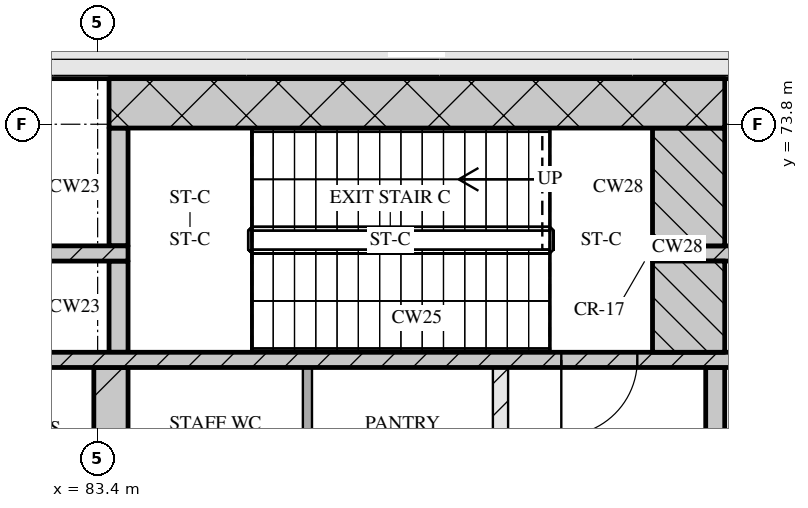
"""IFC4 building model, lengths in metres.
Left out: names, types, materials, properties, quantities, classifications, styles, units other than length and angle.
Written with IfcOpenShell. Run it as: python <this file> out.ifc"""

import sys

from ifc_helpers import new_model, si_unit, direction, frame, frame_2d, origin, place, context, subcontext, project, spatial, rectangle, extrude, element, fill, save


model = new_model("IFC4")
c1 = context("Model", 3, precision=1e-05, world=origin(), true_north=direction((0.0, 1.0)))
c2 = subcontext(c1, "Body", "Model", "MODEL_VIEW")
j1 = project(units=[si_unit("LENGTHUNIT", "METRE"), si_unit("PLANEANGLEUNIT", "RADIAN")], contexts=[c1])
p1 = place(None, origin())
s1 = spatial("IfcSite", under=j1, at=p1, CompositionType="ELEMENT")
p2 = place(p1, origin())
s2 = spatial("IfcBuilding", under=s1, at=p2, CompositionType="ELEMENT")
p3 = place(p2, frame((0.0, 0.0, 252.3)))
s3 = spatial("IfcBuildingStorey", under=s2, at=p3, CompositionType="ELEMENT", Elevation=252.3)
p4 = place(p3, frame((67.3, 74.65, 0.0), z_axis=(0.0, 0.0, 1.0), x_axis=(1.0, 0.0, 0.0)))
e1 = element("IfcWall", 1, at=p4, inside=s3, PredefinedType="SOLIDWALL", context=c2, shape_type="SweptSolid", body=[
    extrude(rectangle(XDim=40.6, YDim=0.5, at=frame_2d((20.3, 0.0))), origin(), (0.0, 0.0, 1.0), 10.97),
])
p5 = place(p3, frame((83.575, 68.0, 0.0), z_axis=(0.0, 0.0, 1.0), x_axis=(0.0, 1.0, 0.0)))
e2 = element("IfcWall", 2, at=p5, inside=s3, PredefinedType="SOLIDWALL", context=c2, shape_type="SweptSolid", body=[
    extrude(rectangle(XDim=2.6, YDim=0.45, at=frame_2d((1.3, 0.0))), origin(), (0.0, 0.0, 1.0), 10.97),
])
p6 = place(p3, frame((86.16, 68.0, 0.0), z_axis=(0.0, 0.0, 1.0), x_axis=(0.0, 1.0, 0.0)))
e3 = element("IfcWall", 3, at=p6, inside=s3, PredefinedType="PARTITIONING", context=c2, shape_type="SweptSolid", body=[
    extrude(rectangle(XDim=2.6, YDim=0.12, at=frame_2d((1.3, 0.0))), origin(), (0.0, 0.0, 1.0), 10.97),
])
p7 = place(p3, frame((88.7, 68.0, 0.0), z_axis=(0.0, 0.0, 1.0), x_axis=(0.0, 1.0, 0.0)))
e4 = element("IfcWall", 4, at=p7, inside=s3, PredefinedType="PARTITIONING", context=c2, shape_type="SweptSolid", body=[
    extrude(rectangle(XDim=2.6, YDim=0.2, at=frame_2d((1.3, 0.0))), origin(), (0.0, 0.0, 1.0), 10.97),
])
p8 = place(p3, frame((91.525, 68.0, 0.0), z_axis=(0.0, 0.0, 1.0), x_axis=(0.0, 1.0, 0.0)))
e5 = element("IfcWall", 5, at=p8, inside=s3, PredefinedType="SOLIDWALL", context=c2, shape_type="SweptSolid", body=[
    extrude(rectangle(XDim=2.6, YDim=0.25, at=frame_2d((1.3, 0.0))), origin(), (0.0, 0.0, 1.0), 10.97),
])
p9 = place(p3, frame((67.8, 70.7, 0.0), z_axis=(0.0, 0.0, 1.0), x_axis=(1.0, 0.0, 0.0)))
e6 = element("IfcWall", 6, at=p9, inside=s3, PredefinedType="SOLIDWALL", context=c2, shape_type="SweptSolid", body=[
    extrude(rectangle(XDim=39.6, YDim=0.2, at=frame_2d((19.8, 0.0))), origin(), (0.0, 0.0, 1.0), 10.97),
])
p10 = place(p9, frame((0.65, 0.0, 0.0)))
e7 = element("IfcOpeningElement", 7, at=p10, cuts=e6, PredefinedType="OPENING", context=c2, shape_type="SweptSolid", body=[
    extrude(rectangle(XDim=1.1, YDim=2.1, at=frame_2d((0.55, 1.05))), frame((0.0, 0.11, 0.0), z_axis=(0.0, -1.0, 0.0), x_axis=(1.0, 0.0, 0.0)), (0.0, 0.0, 1.0), 0.22),
])
p11 = place(p9, frame((3.25, 0.0, 0.0)))
e8 = element("IfcOpeningElement", 8, at=p11, cuts=e6, PredefinedType="OPENING", context=c2, shape_type="SweptSolid", body=[
    extrude(rectangle(XDim=1.1, YDim=2.1, at=frame_2d((0.55, 1.05))), frame((0.0, 0.11, 0.0), z_axis=(0.0, -1.0, 0.0), x_axis=(1.0, 0.0, 0.0)), (0.0, 0.0, 1.0), 0.22),
])
p12 = place(p9, frame((5.9, 0.0, 0.0)))
e9 = element("IfcOpeningElement", 9, at=p12, cuts=e6, PredefinedType="OPENING", context=c2, shape_type="SweptSolid", body=[
    extrude(rectangle(XDim=1.0, YDim=2.1, at=frame_2d((0.5, 1.05))), frame((0.0, 0.11, 0.0), z_axis=(0.0, -1.0, 0.0), x_axis=(1.0, 0.0, 0.0)), (0.0, 0.0, 1.0), 0.22),
])
p13 = place(p9, frame((21.7, 0.0, 0.0)))
e10 = element("IfcOpeningElement", 10, at=p13, cuts=e6, PredefinedType="OPENING", context=c2, shape_type="SweptSolid", body=[
    extrude(rectangle(XDim=1.0, YDim=2.1, at=frame_2d((0.5, 1.05))), frame((0.0, 0.11, 0.0), z_axis=(0.0, -1.0, 0.0), x_axis=(1.0, 0.0, 0.0)), (0.0, 0.0, 1.0), 0.22),
])
p14 = place(p9, frame((32.7, 0.0, 0.0)))
e11 = element("IfcOpeningElement", 11, at=p14, cuts=e6, PredefinedType="OPENING", context=c2, shape_type="SweptSolid", body=[
    extrude(rectangle(XDim=1.0, YDim=2.1, at=frame_2d((0.5, 1.05))), frame((0.0, 0.11, 0.0), z_axis=(0.0, -1.0, 0.0), x_axis=(1.0, 0.0, 0.0)), (0.0, 0.0, 1.0), 0.22),
])
p15 = place(p9, frame((35.25, 0.0, 0.0)))
e12 = element("IfcOpeningElement", 12, at=p15, cuts=e6, PredefinedType="OPENING", context=c2, shape_type="SweptSolid", body=[
    extrude(rectangle(XDim=1.1, YDim=2.1, at=frame_2d((0.55, 1.05))), frame((0.0, 0.11, 0.0), z_axis=(0.0, -1.0, 0.0), x_axis=(1.0, 0.0, 0.0)), (0.0, 0.0, 1.0), 0.22),
])
p16 = place(p9, frame((37.85, 0.0, 0.0)))
e13 = element("IfcOpeningElement", 13, at=p16, cuts=e6, PredefinedType="OPENING", context=c2, shape_type="SweptSolid", body=[
    extrude(rectangle(XDim=1.1, YDim=2.1, at=frame_2d((0.55, 1.05))), frame((0.0, 0.11, 0.0), z_axis=(0.0, -1.0, 0.0), x_axis=(1.0, 0.0, 0.0)), (0.0, 0.0, 1.0), 0.22),
])
p17 = place(p3, frame((83.675, 70.8, 0.0), z_axis=(0.0, 0.0, 1.0), x_axis=(0.0, 1.0, 0.0)))
e14 = element("IfcWall", 14, at=p17, inside=s3, PredefinedType="SOLIDWALL", context=c2, shape_type="SweptSolid", body=[
    extrude(rectangle(XDim=1.2, YDim=0.25, at=frame_2d((0.6, 0.0))), origin(), (0.0, 0.0, 1.0), 10.97),
])
p18 = place(p3, frame((91.175, 70.8, 0.0), z_axis=(0.0, 0.0, 1.0), x_axis=(0.0, 1.0, 0.0)))
e15 = element("IfcWall", 15, at=p18, inside=s3, PredefinedType="SOLIDWALL", context=c2, shape_type="SweptSolid", body=[
    extrude(rectangle(XDim=1.2, YDim=0.95, at=frame_2d((0.6, 0.0))), origin(), (0.0, 0.0, 1.0), 10.97),
])
p19 = place(p3, frame((72.8, 72.1, 0.0), z_axis=(0.0, 0.0, 1.0), x_axis=(1.0, 0.0, 0.0)))
e16 = element("IfcWall", 16, at=p19, inside=s3, PredefinedType="SOLIDWALL", context=c2, shape_type="SweptSolid", body=[
    extrude(rectangle(XDim=11.0, YDim=0.2, at=frame_2d((5.5, 0.0))), origin(), (0.0, 0.0, 1.0), 10.97),
])
p20 = place(p19, frame((1.25, 0.0, 0.0)))
e17 = element("IfcOpeningElement", 17, at=p20, cuts=e16, PredefinedType="OPENING", context=c2, shape_type="SweptSolid", body=[
    extrude(rectangle(XDim=0.9, YDim=2.1, at=frame_2d((0.45, 1.05))), frame((0.0, 0.11, 0.0), z_axis=(0.0, -1.0, 0.0), x_axis=(1.0, 0.0, 0.0)), (0.0, 0.0, 1.0), 0.22),
])
p21 = place(p19, frame((6.475, 0.0, 0.0)))
e18 = element("IfcOpeningElement", 18, at=p21, cuts=e16, PredefinedType="OPENING", context=c2, shape_type="SweptSolid", body=[
    extrude(rectangle(XDim=1.2, YDim=2.1, at=frame_2d((0.6, 1.05))), frame((0.0, 0.11, 0.0), z_axis=(0.0, -1.0, 0.0), x_axis=(1.0, 0.0, 0.0)), (0.0, 0.0, 1.0), 0.22),
])
p22 = place(p3, frame((90.7, 72.1, 0.0), z_axis=(0.0, 0.0, 1.0), x_axis=(1.0, 0.0, 0.0)))
e19 = element("IfcWall", 19, at=p22, inside=s3, PredefinedType="SOLIDWALL", context=c2, shape_type="SweptSolid", body=[
    extrude(rectangle(XDim=11.7, YDim=0.2, at=frame_2d((5.85, 0.0))), origin(), (0.0, 0.0, 1.0), 10.97),
])
p23 = place(p22, frame((4.025, 0.0, 0.0)))
e20 = element("IfcOpeningElement", 20, at=p23, cuts=e19, PredefinedType="OPENING", context=c2, shape_type="SweptSolid", body=[
    extrude(rectangle(XDim=1.2, YDim=2.1, at=frame_2d((0.6, 1.05))), frame((0.0, 0.11, 0.0), z_axis=(0.0, -1.0, 0.0), x_axis=(1.0, 0.0, 0.0)), (0.0, 0.0, 1.0), 0.22),
])
p24 = place(p22, frame((9.55, 0.0, 0.0)))
e21 = element("IfcOpeningElement", 21, at=p24, cuts=e19, PredefinedType="OPENING", context=c2, shape_type="SweptSolid", body=[
    extrude(rectangle(XDim=0.9, YDim=2.1, at=frame_2d((0.45, 1.05))), frame((0.0, 0.11, 0.0), z_axis=(0.0, -1.0, 0.0), x_axis=(1.0, 0.0, 0.0)), (0.0, 0.0, 1.0), 0.22),
])
p25 = place(p3, frame((83.675, 72.2, 0.0), z_axis=(0.0, 0.0, 1.0), x_axis=(0.0, 1.0, 0.0)))
e22 = element("IfcWall", 22, at=p25, inside=s3, PredefinedType="SOLIDWALL", context=c2, shape_type="SweptSolid", body=[
    extrude(rectangle(XDim=1.55, YDim=0.25, at=frame_2d((0.775, 0.0))), origin(), (0.0, 0.0, 1.0), 10.97),
])
p26 = place(p3, frame((91.175, 72.2, 0.0), z_axis=(0.0, 0.0, 1.0), x_axis=(0.0, 1.0, 0.0)))
e23 = element("IfcWall", 23, at=p26, inside=s3, PredefinedType="SOLIDWALL", context=c2, shape_type="SweptSolid", body=[
    extrude(rectangle(XDim=1.55, YDim=0.95, at=frame_2d((0.775, 0.0))), origin(), (0.0, 0.0, 1.0), 10.97),
])
p27 = place(p3, frame((83.55, 74.075, 0.0), z_axis=(0.0, 0.0, 1.0), x_axis=(1.0, 0.0, 0.0)))
e24 = element("IfcWall", 24, at=p27, inside=s3, PredefinedType="SOLIDWALL", context=c2, shape_type="SweptSolid", body=[
    extrude(rectangle(XDim=8.1, YDim=0.65, at=frame_2d((4.05, 0.0))), origin(), (0.0, 0.0, 1.0), 10.97),
])
p28 = place(p13, origin())
e25 = element("IfcDoor", 25, at=p28, inside=s3, OperationType="SINGLE_SWING_RIGHT", PredefinedType="DOOR", context=c2, shape_type="SweptSolid", body=[
    extrude(rectangle(XDim=1.0, YDim=2.1, at=frame_2d((0.5, 1.05))), frame((0.0, 0.025, 0.0), z_axis=(0.0, -1.0, 0.0), x_axis=(1.0, 0.0, 0.0)), (0.0, 0.0, 1.0), 0.05),
])
fill(e10, e25)
save(model, sys.argv[1])
